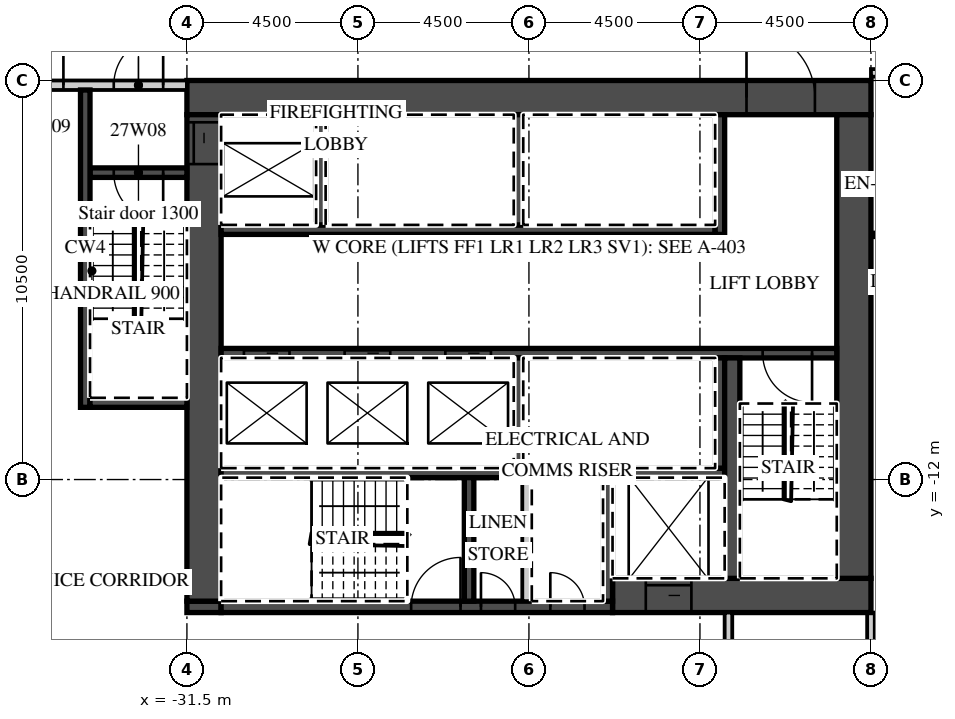
"""IFC4 building model, lengths in metres.
Left out: names, types, materials, properties, quantities, classifications, styles, units other than length and angle.
Written with IfcOpenShell. Run it as: python <this file> out.ifc"""

import sys

from ifc_helpers import new_model, si_unit, direction, frame, frame_2d, origin, place, context, subcontext, project, spatial, rectangle, extrude, element, fill, save


model = new_model("IFC4")
c1 = context("Model", 3, precision=1e-05, world=origin(), true_north=direction((0.0, 1.0)))
c2 = subcontext(c1, "Body", "Model", "MODEL_VIEW")
j1 = project(units=[si_unit("LENGTHUNIT", "METRE"), si_unit("PLANEANGLEUNIT", "RADIAN")], contexts=[c1])
p1 = place(None, origin())
s1 = spatial("IfcSite", under=j1, at=p1, CompositionType="ELEMENT")
p2 = place(p1, origin())
s2 = spatial("IfcBuilding", under=s1, at=p2, CompositionType="ELEMENT")
p3 = place(p2, frame((0.0, 0.0, 124.0)))
s3 = spatial("IfcBuildingStorey", under=s2, at=p3, CompositionType="ELEMENT", Elevation=124.0)
p4 = place(p3, frame((-13.5, -22.232, 0.0), z_axis=(0.0, 0.0, 1.0), x_axis=(0.0, 1.0, 0.0)))
e1 = element("IfcWall", 1, at=p4, inside=s3, PredefinedType="PARTITIONING", context=c2, shape_type="SweptSolid", body=[
    extrude(rectangle(XDim=6.732, YDim=0.2, at=frame_2d((3.366, 0.0))), origin(), (0.0, 0.0, 1.0), 3.02),
])
p5 = place(p3, frame((-13.5, -1.3, 0.0), z_axis=(0.0, 0.0, 1.0), x_axis=(1.0, 0.0, 0.0)))
e2 = element("IfcWall", 2, at=p5, inside=s3, PredefinedType="PARTITIONING", context=c2, shape_type="SweptSolid", body=[
    extrude(rectangle(XDim=60.932, YDim=0.2, at=frame_2d((30.466, 0.0))), origin(), (0.0, 0.0, 1.0), 3.02),
])
p6 = place(p5, frame((2.925, 0.0, 0.0)))
e3 = element("IfcOpeningElement", 3, at=p6, cuts=e2, PredefinedType="OPENING", context=c2, shape_type="SweptSolid", body=[
    extrude(rectangle(XDim=1.0, YDim=2.1, at=frame_2d((0.5, 1.05))), frame((0.0, 0.11, 0.0), z_axis=(0.0, -1.0, 0.0), x_axis=(1.0, 0.0, 0.0)), (0.0, 0.0, 1.0), 0.22),
])
p7 = place(p5, frame((9.863, 0.0, 0.0)))
e4 = element("IfcOpeningElement", 4, at=p7, cuts=e2, PredefinedType="OPENING", context=c2, shape_type="SweptSolid", body=[
    extrude(rectangle(XDim=1.2, YDim=2.1, at=frame_2d((0.6, 1.05))), frame((0.0, 0.11, 0.0), z_axis=(0.0, -1.0, 0.0), x_axis=(1.0, 0.0, 0.0)), (0.0, 0.0, 1.0), 0.22),
])
p8 = place(p5, frame((15.938, 0.0, 0.0)))
e5 = element("IfcOpeningElement", 5, at=p8, cuts=e2, PredefinedType="OPENING", context=c2, shape_type="SweptSolid", body=[
    extrude(rectangle(XDim=1.2, YDim=2.1, at=frame_2d((0.6, 1.05))), frame((0.0, 0.11, 0.0), z_axis=(0.0, -1.0, 0.0), x_axis=(1.0, 0.0, 0.0)), (0.0, 0.0, 1.0), 0.22),
])
p9 = place(p5, frame((27.862, 0.0, 0.0)))
e6 = element("IfcOpeningElement", 6, at=p9, cuts=e2, PredefinedType="OPENING", context=c2, shape_type="SweptSolid", body=[
    extrude(rectangle(XDim=1.2, YDim=2.1, at=frame_2d((0.6, 1.05))), frame((0.0, 0.11, 0.0), z_axis=(0.0, -1.0, 0.0), x_axis=(1.0, 0.0, 0.0)), (0.0, 0.0, 1.0), 0.22),
])
p10 = place(p5, frame((34.45, 0.0, 0.0)))
e7 = element("IfcOpeningElement", 7, at=p10, cuts=e2, PredefinedType="OPENING", context=c2, shape_type="SweptSolid", body=[
    extrude(rectangle(XDim=1.0, YDim=2.1, at=frame_2d((0.5, 1.05))), frame((0.0, 0.11, 0.0), z_axis=(0.0, -1.0, 0.0), x_axis=(1.0, 0.0, 0.0)), (0.0, 0.0, 1.0), 0.22),
])
p11 = place(p5, frame((36.55, 0.0, 0.0)))
e8 = element("IfcOpeningElement", 8, at=p11, cuts=e2, PredefinedType="OPENING", context=c2, shape_type="SweptSolid", body=[
    extrude(rectangle(XDim=1.0, YDim=2.1, at=frame_2d((0.5, 1.05))), frame((0.0, 0.11, 0.0), z_axis=(0.0, -1.0, 0.0), x_axis=(1.0, 0.0, 0.0)), (0.0, 0.0, 1.0), 0.22),
])
p12 = place(p5, frame((41.075, 0.0, 0.0)))
e9 = element("IfcOpeningElement", 9, at=p12, cuts=e2, PredefinedType="OPENING", context=c2, shape_type="SweptSolid", body=[
    extrude(rectangle(XDim=1.0, YDim=2.1, at=frame_2d((0.5, 1.05))), frame((0.0, 0.11, 0.0), z_axis=(0.0, -1.0, 0.0), x_axis=(1.0, 0.0, 0.0)), (0.0, 0.0, 1.0), 0.22),
])
p13 = place(p5, frame((45.55, 0.0, 0.0)))
e10 = element("IfcOpeningElement", 10, at=p13, cuts=e2, PredefinedType="OPENING", context=c2, shape_type="SweptSolid", body=[
    extrude(rectangle(XDim=1.0, YDim=2.1, at=frame_2d((0.5, 1.05))), frame((0.0, 0.11, 0.0), z_axis=(0.0, -1.0, 0.0), x_axis=(1.0, 0.0, 0.0)), (0.0, 0.0, 1.0), 0.22),
])
p14 = place(p5, frame((50.075, 0.0, 0.0)))
e11 = element("IfcOpeningElement", 11, at=p14, cuts=e2, PredefinedType="OPENING", context=c2, shape_type="SweptSolid", body=[
    extrude(rectangle(XDim=1.0, YDim=2.1, at=frame_2d((0.5, 1.05))), frame((0.0, 0.11, 0.0), z_axis=(0.0, -1.0, 0.0), x_axis=(1.0, 0.0, 0.0)), (0.0, 0.0, 1.0), 0.22),
])
p15 = place(p5, frame((54.575, 0.0, 0.0)))
e12 = element("IfcOpeningElement", 12, at=p15, cuts=e2, PredefinedType="OPENING", context=c2, shape_type="SweptSolid", body=[
    extrude(rectangle(XDim=1.0, YDim=2.1, at=frame_2d((0.5, 1.05))), frame((0.0, 0.11, 0.0), z_axis=(0.0, -1.0, 0.0), x_axis=(1.0, 0.0, 0.0)), (0.0, 0.0, 1.0), 0.22),
])
p16 = place(p5, frame((59.882, 0.0, 0.0)))
e13 = element("IfcOpeningElement", 13, at=p16, cuts=e2, PredefinedType="OPENING", context=c2, shape_type="SweptSolid", body=[
    extrude(rectangle(XDim=0.9, YDim=2.1, at=frame_2d((0.45, 1.05))), frame((0.0, 0.11, 0.0), z_axis=(0.0, -1.0, 0.0), x_axis=(1.0, 0.0, 0.0)), (0.0, 0.0, 1.0), 0.22),
])
p17 = place(p3, frame((-31.5, -1.95, 0.0), z_axis=(0.0, 0.0, 1.0), x_axis=(1.0, 0.0, 0.0)))
e14 = element("IfcWall", 14, at=p17, inside=s3, PredefinedType="SHEAR", context=c2, shape_type="SweptSolid", body=[
    extrude(rectangle(XDim=18.0, YDim=0.9, at=frame_2d((9.0, 0.0))), origin(), (0.0, 0.0, 1.0), 3.02),
])
p18 = place(p17, frame((14.725, 0.0, 0.0)))
e15 = element("IfcOpeningElement", 15, at=p18, cuts=e14, PredefinedType="OPENING", context=c2, shape_type="SweptSolid", body=[
    extrude(rectangle(XDim=1.8, YDim=2.1, at=frame_2d((0.9, 1.05))), frame((0.0, 0.46, 0.0), z_axis=(0.0, -1.0, 0.0), x_axis=(1.0, 0.0, 0.0)), (0.0, 0.0, 1.0), 0.92),
])
p19 = place(p3, frame((-20.3, -15.05, 0.0), z_axis=(0.0, 0.0, 1.0), x_axis=(1.0, 0.0, 0.0)))
e16 = element("IfcWall", 16, at=p19, inside=s3, PredefinedType="SHEAR", context=c2, shape_type="SweptSolid", body=[
    extrude(rectangle(XDim=6.8, YDim=0.9, at=frame_2d((3.4, 0.0))), origin(), (0.0, 0.0, 1.0), 3.02),
])
p20 = place(p19, frame((0.875, 0.0, 0.0)))
e17 = element("IfcOpeningElement", 17, at=p20, cuts=e16, PredefinedType="OPENING", context=c2, shape_type="SweptSolid", body=[
    extrude(rectangle(XDim=1.2, YDim=2.1, at=frame_2d((0.6, 1.05))), frame((0.0, 0.46, 0.0), z_axis=(0.0, -1.0, 0.0), x_axis=(1.0, 0.0, 0.0)), (0.0, 0.0, 1.0), 0.92),
])
p21 = place(p3, frame((-31.5, -15.35, 0.0), z_axis=(0.0, 0.0, 1.0), x_axis=(1.0, 0.0, 0.0)))
e18 = element("IfcWall", 18, at=p21, inside=s3, PredefinedType="SHEAR", context=c2, shape_type="SweptSolid", body=[
    extrude(rectangle(XDim=0.9, YDim=0.3, at=frame_2d((0.45, 0.0))), origin(), (0.0, 0.0, 1.0), 3.02),
])
p22 = place(p3, frame((-30.6, -15.35, 0.0), z_axis=(0.0, 0.0, 1.0), x_axis=(1.0, 0.0, 0.0)))
e19 = element("IfcWall", 19, at=p22, inside=s3, PredefinedType="SHEAR", context=c2, shape_type="SweptSolid", body=[
    extrude(rectangle(XDim=10.3, YDim=0.3, at=frame_2d((5.15, 0.0))), origin(), (0.0, 0.0, 1.0), 3.02),
])
p23 = place(p22, frame((5.0, 0.0, 0.0)))
e20 = element("IfcOpeningElement", 20, at=p23, cuts=e19, PredefinedType="OPENING", context=c2, shape_type="SweptSolid", body=[
    extrude(rectangle(XDim=1.3, YDim=2.1, at=frame_2d((0.65, 1.05))), frame((0.0, 0.16, 0.0), z_axis=(0.0, -1.0, 0.0), x_axis=(1.0, 0.0, 0.0)), (0.0, 0.0, 1.0), 0.32),
])
p24 = place(p22, frame((6.837, 0.0, 0.0)))
e21 = element("IfcOpeningElement", 21, at=p24, cuts=e19, PredefinedType="OPENING", context=c2, shape_type="SweptSolid", body=[
    extrude(rectangle(XDim=0.9, YDim=2.1, at=frame_2d((0.45, 1.05))), frame((0.0, 0.16, 0.0), z_axis=(0.0, -1.0, 0.0), x_axis=(1.0, 0.0, 0.0)), (0.0, 0.0, 1.0), 0.32),
])
p25 = place(p22, frame((8.663, 0.0, 0.0)))
e22 = element("IfcOpeningElement", 22, at=p25, cuts=e19, PredefinedType="OPENING", context=c2, shape_type="SweptSolid", body=[
    extrude(rectangle(XDim=0.9, YDim=2.1, at=frame_2d((0.45, 1.05))), frame((0.0, 0.16, 0.0), z_axis=(0.0, -1.0, 0.0), x_axis=(1.0, 0.0, 0.0)), (0.0, 0.0, 1.0), 0.32),
])
p26 = place(p3, frame((-31.05, -15.2, 0.0), z_axis=(0.0, 0.0, 1.0), x_axis=(0.0, 1.0, 0.0)))
e23 = element("IfcWall", 23, at=p26, inside=s3, PredefinedType="SHEAR", context=c2, shape_type="SweptSolid", body=[
    extrude(rectangle(XDim=12.8, YDim=0.9, at=frame_2d((6.4, 0.0))), origin(), (0.0, 0.0, 1.0), 3.02),
])
p27 = place(p26, frame((11.5, 0.0, 0.0)))
e24 = element("IfcOpeningElement", 24, at=p27, cuts=e23, PredefinedType="OPENING", context=c2, shape_type="SweptSolid", body=[
    extrude(rectangle(XDim=1.1, YDim=2.1, at=frame_2d((0.55, 1.05))), frame((0.0, 0.46, 0.0), z_axis=(0.0, -1.0, 0.0), x_axis=(1.0, 0.0, 0.0)), (0.0, 0.0, 1.0), 0.92),
])
p28 = place(p3, frame((-13.95, -14.6, 0.0), z_axis=(0.0, 0.0, 1.0), x_axis=(0.0, 1.0, 0.0)))
e25 = element("IfcWall", 25, at=p28, inside=s3, PredefinedType="SHEAR", context=c2, shape_type="SweptSolid", body=[
    extrude(rectangle(XDim=12.2, YDim=0.9, at=frame_2d((6.1, 0.0))), origin(), (0.0, 0.0, 1.0), 3.02),
])
p29 = place(p3, frame((-30.6, -5.425, 0.0), z_axis=(0.0, 0.0, 1.0), x_axis=(1.0, 0.0, 0.0)))
e26 = element("IfcWall", 26, at=p29, inside=s3, PredefinedType="SHEAR", context=c2, shape_type="SweptSolid", body=[
    extrude(rectangle(XDim=13.0, YDim=0.25, at=frame_2d((6.5, 0.0))), origin(), (0.0, 0.0, 1.0), 3.02),
])
p30 = place(p3, frame((-17.475, -5.55, 0.0), z_axis=(0.0, 0.0, 1.0), x_axis=(0.0, 1.0, 0.0)))
e27 = element("IfcWall", 27, at=p30, inside=s3, PredefinedType="SHEAR", context=c2, shape_type="SweptSolid", body=[
    extrude(rectangle(XDim=3.15, YDim=0.25, at=frame_2d((1.575, 0.0))), origin(), (0.0, 0.0, 1.0), 3.02),
])
for number, where, z_axis, x_axis in (
    (28, (-27.975, -5.3, 0.0), (0.0, 0.0, 1.0), (0.0, 1.0, 0.0)),
    (29, (-22.775, -5.3, 0.0), (0.0, 0.0, 1.0), (0.0, 1.0, 0.0)),
):
    element("IfcWall", number, at=place(p3, frame(where, z_axis=z_axis, x_axis=x_axis)), inside=s3, PredefinedType="SHEAR", context=c2, shape_type="SweptSolid", body=[
        extrude(rectangle(XDim=2.9, YDim=0.25, at=frame_2d((1.45, 0.0))), origin(), (0.0, 0.0, 1.0), 3.02),
    ])
p31 = place(p3, frame((-30.6, -8.675, 0.0), z_axis=(0.0, 0.0, 1.0), x_axis=(1.0, 0.0, 0.0)))
e30 = element("IfcWall", 30, at=p31, inside=s3, PredefinedType="SHEAR", context=c2, shape_type="SweptSolid", body=[
    extrude(rectangle(XDim=16.2, YDim=0.25, at=frame_2d((8.1, 0.0))), origin(), (0.0, 0.0, 1.0), 3.02),
])
p32 = place(p31, frame((0.6, 0.0, 0.0)))
e31 = element("IfcOpeningElement", 31, at=p32, cuts=e30, PredefinedType="OPENING", context=c2, shape_type="SweptSolid", body=[
    extrude(rectangle(XDim=1.2, YDim=2.1, at=frame_2d((0.6, 1.05))), frame((0.0, 0.135, 0.0), z_axis=(0.0, -1.0, 0.0), x_axis=(1.0, 0.0, 0.0)), (0.0, 0.0, 1.0), 0.27),
])
p33 = place(p31, frame((3.25, 0.0, 0.0)))
e32 = element("IfcOpeningElement", 32, at=p33, cuts=e30, PredefinedType="OPENING", context=c2, shape_type="SweptSolid", body=[
    extrude(rectangle(XDim=1.2, YDim=2.1, at=frame_2d((0.6, 1.05))), frame((0.0, 0.135, 0.0), z_axis=(0.0, -1.0, 0.0), x_axis=(1.0, 0.0, 0.0)), (0.0, 0.0, 1.0), 0.27),
])
p34 = place(p31, frame((5.9, 0.0, 0.0)))
e33 = element("IfcOpeningElement", 33, at=p34, cuts=e30, PredefinedType="OPENING", context=c2, shape_type="SweptSolid", body=[
    extrude(rectangle(XDim=1.2, YDim=2.1, at=frame_2d((0.6, 1.05))), frame((0.0, 0.135, 0.0), z_axis=(0.0, -1.0, 0.0), x_axis=(1.0, 0.0, 0.0)), (0.0, 0.0, 1.0), 0.27),
])
p35 = place(p31, frame((14.25, 0.0, 0.0)))
e34 = element("IfcOpeningElement", 34, at=p35, cuts=e30, PredefinedType="OPENING", context=c2, shape_type="SweptSolid", body=[
    extrude(rectangle(XDim=1.3, YDim=2.1, at=frame_2d((0.65, 1.05))), frame((0.0, 0.135, 0.0), z_axis=(0.0, -1.0, 0.0), x_axis=(1.0, 0.0, 0.0)), (0.0, 0.0, 1.0), 0.27),
])
p36 = place(p3, frame((-30.6, -11.825, 0.0), z_axis=(0.0, 0.0, 1.0), x_axis=(1.0, 0.0, 0.0)))
e35 = element("IfcWall", 35, at=p36, inside=s3, PredefinedType="SHEAR", context=c2, shape_type="SweptSolid", body=[
    extrude(rectangle(XDim=13.25, YDim=0.25, at=frame_2d((6.625, 0.0))), origin(), (0.0, 0.0, 1.0), 3.02),
])
for number, where, z_axis, x_axis in (
    (36, (-17.475, -11.7, 0.0), (0.0, 0.0, 1.0), (0.0, 1.0, 0.0)),
    (37, (-22.775, -11.7, 0.0), (0.0, 0.0, 1.0), (0.0, 1.0, 0.0)),
):
    element("IfcWall", number, at=place(p3, frame(where, z_axis=z_axis, x_axis=x_axis)), inside=s3, PredefinedType="SHEAR", context=c2, shape_type="SweptSolid", body=[
        extrude(rectangle(XDim=2.9, YDim=0.25, at=frame_2d((1.45, 0.0))), origin(), (0.0, 0.0, 1.0), 3.02),
    ])
p37 = place(p3, frame((-17.15, -14.6, 0.0), z_axis=(0.0, 0.0, 1.0), x_axis=(0.0, 1.0, 0.0)))
e38 = element("IfcWall", 38, at=p37, inside=s3, PredefinedType="SHEAR", context=c2, shape_type="SweptSolid", body=[
    extrude(rectangle(XDim=5.8, YDim=0.4, at=frame_2d((2.9, 0.0))), origin(), (0.0, 0.0, 1.0), 3.02),
])
for number, where, z_axis, x_axis in (
    (39, (-20.425, -15.2, 0.0), (0.0, 0.0, 1.0), (0.0, 1.0, 0.0)),
    (40, (-24.075, -15.2, 0.0), (0.0, 0.0, 1.0), (0.0, 1.0, 0.0)),
):
    element("IfcWall", number, at=place(p3, frame(where, z_axis=z_axis, x_axis=x_axis)), inside=s3, PredefinedType="SHEAR", context=c2, shape_type="SweptSolid", body=[
        extrude(rectangle(XDim=3.25, YDim=0.25, at=frame_2d((1.625, 0.0))), origin(), (0.0, 0.0, 1.0), 3.02),
    ])
p38 = place(p3, frame((-22.55, -15.2, 0.0), z_axis=(0.0, 0.0, 1.0), x_axis=(0.0, 1.0, 0.0)))
e41 = element("IfcWall", 41, at=p38, inside=s3, PredefinedType="PARTITIONING", context=c2, shape_type="SweptSolid", body=[
    extrude(rectangle(XDim=3.25, YDim=0.25, at=frame_2d((1.625, 0.0))), origin(), (0.0, 0.0, 1.0), 3.02),
])
p39 = place(p3, frame((-39.035, -1.625, 0.0), z_axis=(0.0, 0.0, 1.0), x_axis=(1.0, 0.0, 0.0)))
e42 = element("IfcWall", 42, at=p39, inside=s3, PredefinedType="PARTITIONING", context=c2, shape_type="SweptSolid", body=[
    extrude(rectangle(XDim=7.535, YDim=0.25, at=frame_2d((3.768, 0.0))), origin(), (0.0, 0.0, 1.0), 3.02),
])
p40 = place(p39, frame((5.61, 0.0, 0.0)))
e43 = element("IfcOpeningElement", 43, at=p40, cuts=e42, PredefinedType="OPENING", context=c2, shape_type="SweptSolid", body=[
    extrude(rectangle(XDim=1.3, YDim=2.1, at=frame_2d((0.65, 1.05))), frame((0.0, 0.135, 0.0), z_axis=(0.0, -1.0, 0.0), x_axis=(1.0, 0.0, 0.0)), (0.0, 0.0, 1.0), 0.27),
])
p41 = place(p39, frame((3.185, 0.0, 0.0)))
e44 = element("IfcOpeningElement", 44, at=p41, cuts=e42, PredefinedType="OPENING", context=c2, shape_type="SweptSolid", body=[
    extrude(rectangle(XDim=1.1, YDim=2.1, at=frame_2d((0.55, 1.05))), frame((0.0, 0.135, 0.0), z_axis=(0.0, -1.0, 0.0), x_axis=(1.0, 0.0, 0.0)), (0.0, 0.0, 1.0), 0.27),
])
p42 = place(p3, frame((-34.05, -3.925, 0.0), z_axis=(0.0, 0.0, 1.0), x_axis=(1.0, 0.0, 0.0)))
e45 = element("IfcWall", 45, at=p42, inside=s3, PredefinedType="SHEAR", context=c2, shape_type="SweptSolid", body=[
    extrude(rectangle(XDim=2.55, YDim=0.25, at=frame_2d((1.275, 0.0))), origin(), (0.0, 0.0, 1.0), 3.02),
])
p43 = place(p42, frame((0.625, 0.0, 0.0)))
e46 = element("IfcOpeningElement", 46, at=p43, cuts=e45, PredefinedType="OPENING", context=c2, shape_type="SweptSolid", body=[
    extrude(rectangle(XDim=1.3, YDim=2.1, at=frame_2d((0.65, 1.05))), frame((0.0, 0.135, 0.0), z_axis=(0.0, -1.0, 0.0), x_axis=(1.0, 0.0, 0.0)), (0.0, 0.0, 1.0), 0.27),
])
p44 = place(p3, frame((-34.175, -10.1, 0.0), z_axis=(0.0, 0.0, 1.0), x_axis=(0.0, 1.0, 0.0)))
e47 = element("IfcWall", 47, at=p44, inside=s3, PredefinedType="SHEAR", context=c2, shape_type="SweptSolid", body=[
    extrude(rectangle(XDim=8.35, YDim=0.25, at=frame_2d((4.175, 0.0))), origin(), (0.0, 0.0, 1.0), 3.02),
])
p45 = place(p3, frame((-34.05, -9.975, 0.0), z_axis=(0.0, 0.0, 1.0), x_axis=(1.0, 0.0, 0.0)))
e48 = element("IfcWall", 48, at=p45, inside=s3, PredefinedType="SHEAR", context=c2, shape_type="SweptSolid", body=[
    extrude(rectangle(XDim=2.55, YDim=0.25, at=frame_2d((1.275, 0.0))), origin(), (0.0, 0.0, 1.0), 3.02),
])
p46 = place(p3, frame((-17.25, -17.7, 0.0), z_axis=(0.0, 0.0, 1.0), x_axis=(0.0, 1.0, 0.0)))
e49 = element("IfcWall", 49, at=p46, inside=s3, PredefinedType="PARTITIONING", context=c2, shape_type="SweptSolid", body=[
    extrude(rectangle(XDim=2.2, YDim=0.2, at=frame_2d((1.1, 0.0))), origin(), (0.0, 0.0, 1.0), 3.02),
])
p47 = place(p32, origin())
e50 = element("IfcDoor", 50, at=p47, inside=s3, OperationType="SLIDING_TO_LEFT", PredefinedType="DOOR", context=c2, shape_type="SweptSolid", body=[
    extrude(rectangle(XDim=1.2, YDim=2.1, at=frame_2d((0.6, 1.05))), frame((0.0, 0.025, 0.0), z_axis=(0.0, -1.0, 0.0), x_axis=(1.0, 0.0, 0.0)), (0.0, 0.0, 1.0), 0.05),
])
fill(e31, e50)
p48 = place(p33, origin())
e51 = element("IfcDoor", 51, at=p48, inside=s3, OperationType="SLIDING_TO_RIGHT", PredefinedType="DOOR", context=c2, shape_type="SweptSolid", body=[
    extrude(rectangle(XDim=1.2, YDim=2.1, at=frame_2d((0.6, 1.05))), frame((0.0, 0.025, 0.0), z_axis=(0.0, -1.0, 0.0), x_axis=(1.0, 0.0, 0.0)), (0.0, 0.0, 1.0), 0.05),
])
fill(e32, e51)
p49 = place(p34, origin())
e52 = element("IfcDoor", 52, at=p49, inside=s3, OperationType="SLIDING_TO_RIGHT", PredefinedType="DOOR", context=c2, shape_type="SweptSolid", body=[
    extrude(rectangle(XDim=1.2, YDim=2.1, at=frame_2d((0.6, 1.05))), frame((0.0, 0.025, 0.0), z_axis=(0.0, -1.0, 0.0), x_axis=(1.0, 0.0, 0.0)), (0.0, 0.0, 1.0), 0.05),
])
fill(e33, e52)
p50 = place(p20, origin())
e53 = element("IfcDoor", 53, at=p50, inside=s3, OperationType="SLIDING_TO_LEFT", PredefinedType="DOOR", context=c2, shape_type="SweptSolid", body=[
    extrude(rectangle(XDim=1.2, YDim=2.1, at=frame_2d((0.6, 1.05))), frame((0.0, 0.025, 0.0), z_axis=(0.0, -1.0, 0.0), x_axis=(1.0, 0.0, 0.0)), (0.0, 0.0, 1.0), 0.05),
])
fill(e17, e53)
p51 = place(p27, origin())
e54 = element("IfcDoor", 54, at=p51, inside=s3, OperationType="SLIDING_TO_RIGHT", PredefinedType="DOOR", context=c2, shape_type="SweptSolid", body=[
    extrude(rectangle(XDim=1.1, YDim=2.1, at=frame_2d((0.55, 1.05))), frame((0.0, 0.025, 0.0), z_axis=(0.0, -1.0, 0.0), x_axis=(1.0, 0.0, 0.0)), (0.0, 0.0, 1.0), 0.05),
])
fill(e24, e54)
p52 = place(p18, origin())
e55 = element("IfcDoor", 55, at=p52, inside=s3, OperationType="DOUBLE_DOOR_DOUBLE_SWING", PredefinedType="DOOR", context=c2, shape_type="SweptSolid", body=[
    extrude(rectangle(XDim=1.8, YDim=2.1, at=frame_2d((0.9, 1.05))), frame((0.0, 0.025, 0.0), z_axis=(0.0, -1.0, 0.0), x_axis=(1.0, 0.0, 0.0)), (0.0, 0.0, 1.0), 0.05),
])
fill(e15, e55)
p53 = place(p40, origin())
e56 = element("IfcDoor", 56, at=p53, inside=s3, OperationType="SINGLE_SWING_RIGHT", PredefinedType="DOOR", context=c2, shape_type="SweptSolid", body=[
    extrude(rectangle(XDim=1.3, YDim=2.1, at=frame_2d((0.65, 1.05))), frame((0.0, 0.025, 0.0), z_axis=(0.0, -1.0, 0.0), x_axis=(1.0, 0.0, 0.0)), (0.0, 0.0, 1.0), 0.05),
])
fill(e43, e56)
p54 = place(p43, origin())
e57 = element("IfcDoor", 57, at=p54, inside=s3, OperationType="SINGLE_SWING_RIGHT", PredefinedType="DOOR", context=c2, shape_type="SweptSolid", body=[
    extrude(rectangle(XDim=1.3, YDim=2.1, at=frame_2d((0.65, 1.05))), frame((0.0, 0.025, 0.0), z_axis=(0.0, -1.0, 0.0), x_axis=(1.0, 0.0, 0.0)), (0.0, 0.0, 1.0), 0.05),
])
fill(e46, e57)
p55 = place(p41, origin())
e58 = element("IfcDoor", 58, at=p55, inside=s3, OperationType="SINGLE_SWING_RIGHT", PredefinedType="DOOR", context=c2, shape_type="SweptSolid", body=[
    extrude(rectangle(XDim=1.1, YDim=2.1, at=frame_2d((0.55, 1.05))), frame((0.0, 0.025, 0.0), z_axis=(0.0, -1.0, 0.0), x_axis=(1.0, 0.0, 0.0)), (0.0, 0.0, 1.0), 0.05),
])
fill(e44, e58)
p56 = place(p35, origin())
e59 = element("IfcDoor", 59, at=p56, inside=s3, OperationType="SINGLE_SWING_RIGHT", PredefinedType="DOOR", context=c2, shape_type="SweptSolid", body=[
    extrude(rectangle(XDim=1.3, YDim=2.1, at=frame_2d((0.65, 1.05))), frame((0.0, 0.025, 0.0), z_axis=(0.0, -1.0, 0.0), x_axis=(1.0, 0.0, 0.0)), (0.0, 0.0, 1.0), 0.05),
])
fill(e34, e59)
p57 = place(p23, origin())
e60 = element("IfcDoor", 60, at=p57, inside=s3, OperationType="SINGLE_SWING_RIGHT", PredefinedType="DOOR", context=c2, shape_type="SweptSolid", body=[
    extrude(rectangle(XDim=1.3, YDim=2.1, at=frame_2d((0.65, 1.05))), frame((0.0, 0.025, 0.0), z_axis=(0.0, -1.0, 0.0), x_axis=(1.0, 0.0, 0.0)), (0.0, 0.0, 1.0), 0.05),
])
fill(e20, e60)
p58 = place(p24, origin())
e61 = element("IfcDoor", 61, at=p58, inside=s3, OperationType="SINGLE_SWING_LEFT", PredefinedType="DOOR", context=c2, shape_type="SweptSolid", body=[
    extrude(rectangle(XDim=0.9, YDim=2.1, at=frame_2d((0.45, 1.05))), frame((0.0, 0.025, 0.0), z_axis=(0.0, -1.0, 0.0), x_axis=(1.0, 0.0, 0.0)), (0.0, 0.0, 1.0), 0.05),
])
fill(e21, e61)
p59 = place(p25, origin())
e62 = element("IfcDoor", 62, at=p59, inside=s3, OperationType="SINGLE_SWING_LEFT", PredefinedType="DOOR", context=c2, shape_type="SweptSolid", body=[
    extrude(rectangle(XDim=0.9, YDim=2.1, at=frame_2d((0.45, 1.05))), frame((0.0, 0.025, 0.0), z_axis=(0.0, -1.0, 0.0), x_axis=(1.0, 0.0, 0.0)), (0.0, 0.0, 1.0), 0.05),
])
fill(e22, e62)
save(model, sys.argv[1])
